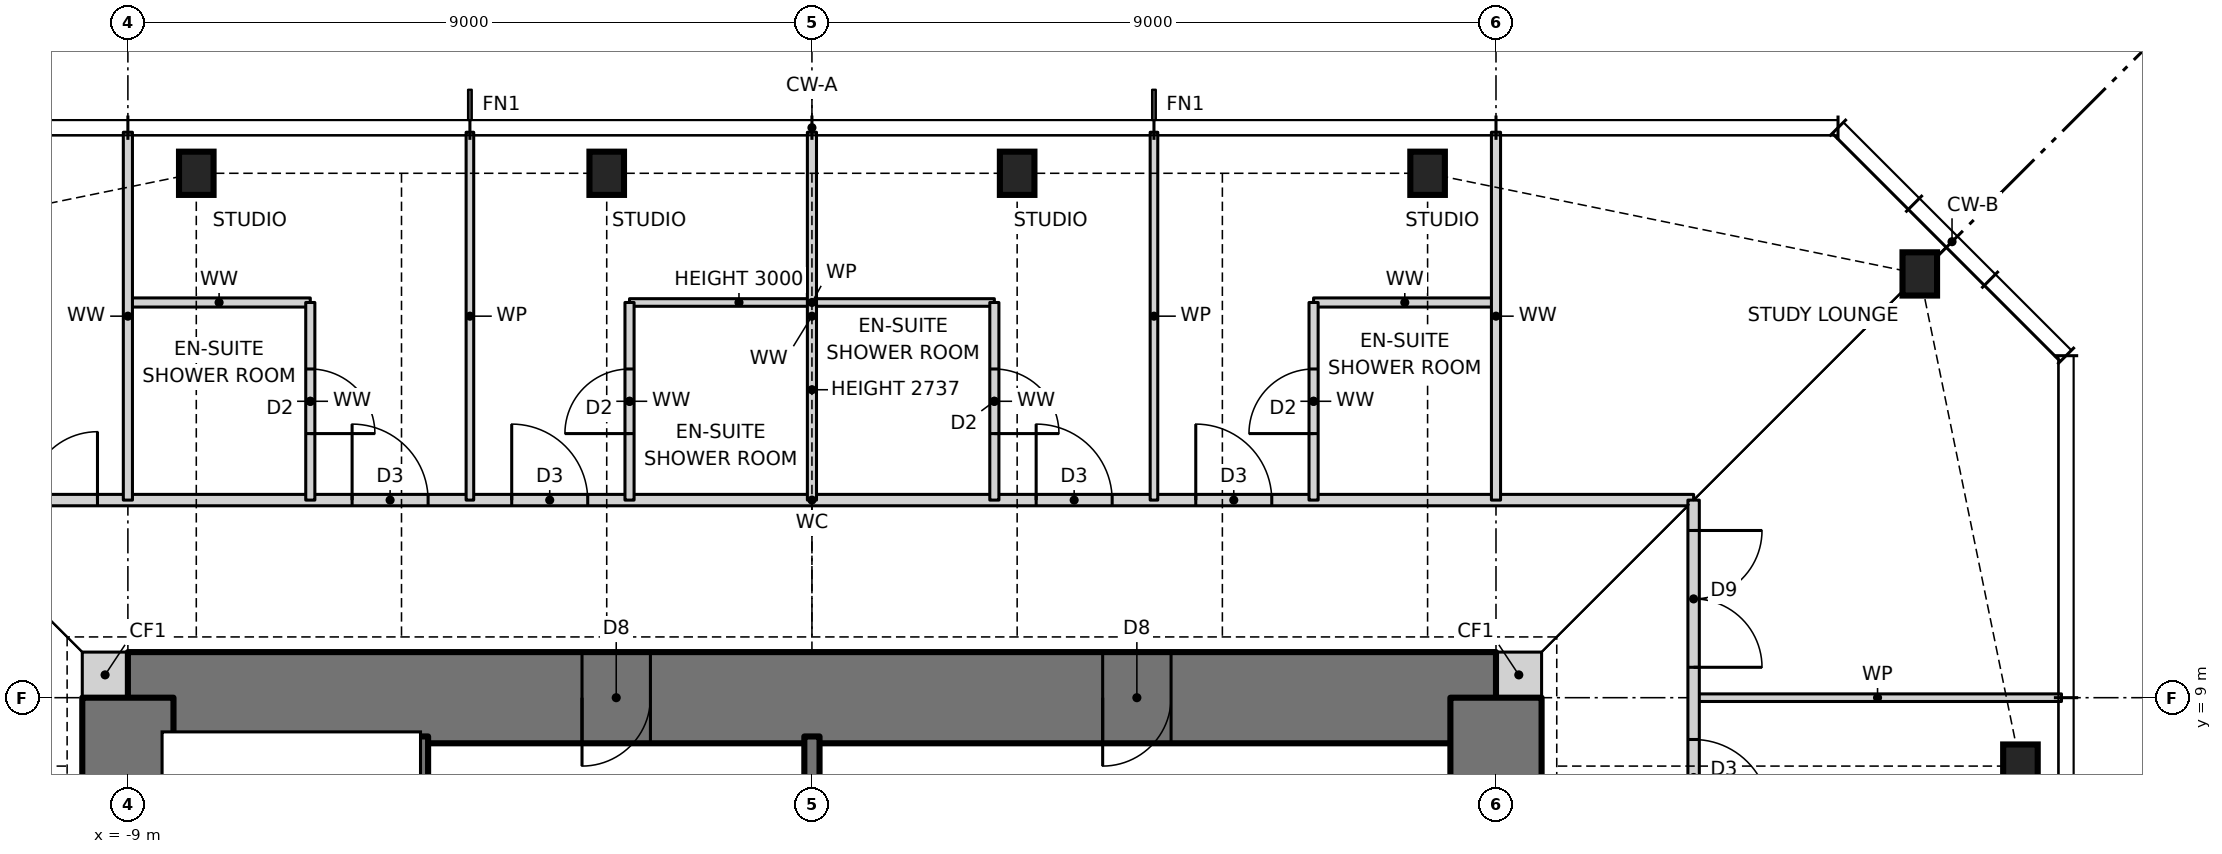
"""IFC4 building model, lengths in metres.
Left out: names, types, materials, properties, quantities, classifications, styles, units other than length and angle.
Written with IfcOpenShell. Run it as: python <this file> out.ifc"""

import sys

from ifc_helpers import new_model, si_unit, direction, frame, frame_2d, origin, origin_2d, place, context, subcontext, project, spatial, rectangle, i_section, extrude, element, fill, save


model = new_model("IFC4")
c1 = context("Model", 3, precision=1e-05, world=origin(), true_north=direction((0.0, 1.0)))
c2 = subcontext(c1, "Body", "Model", "MODEL_VIEW")
j1 = project(units=[si_unit("LENGTHUNIT", "METRE"), si_unit("PLANEANGLEUNIT", "RADIAN")], contexts=[c1])
p1 = place(None, origin())
s1 = spatial("IfcSite", under=j1, at=p1, CompositionType="ELEMENT")
p2 = place(p1, origin())
s2 = spatial("IfcBuilding", under=s1, at=p2, CompositionType="ELEMENT")
p3 = place(p2, frame((0.0, 0.0, 218.5)))
s3 = spatial("IfcBuildingStorey", under=s2, at=p3, CompositionType="ELEMENT", Elevation=218.5)
for number, where, z_axis, x_axis in (
    (1, (15.9, 8.1, 0.0), (0.0, 0.0, 1.0), (1.0, 0.0, 0.0)),
    (2, (14.576, 14.576, 0.0), (0.0, 0.0, 1.0), (1.0, 0.0, 0.0)),
    (3, (8.1, 15.9, 0.0), (0.0, 0.0, 1.0), (1.0, 0.0, 0.0)),
    (4, (2.7, 15.9, 0.0), (0.0, 0.0, 1.0), (1.0, 0.0, 0.0)),
    (5, (-2.7, 15.9, 0.0), (0.0, 0.0, 1.0), (1.0, 0.0, 0.0)),
    (6, (-8.1, 15.9, 0.0), (0.0, 0.0, 1.0), (1.0, 0.0, 0.0)),
):
    element("IfcColumn", number, at=place(p3, frame(where, z_axis=z_axis, x_axis=x_axis)), inside=s3, PredefinedType="COLUMN", context=c2, shape_type="SweptSolid", body=[
        extrude(i_section(OverallWidth=0.455, OverallDepth=0.569, WebThickness=0.078, FlangeThickness=0.125, at=origin_2d()), origin(), (0.0, 0.0, 1.0), 3.5),
    ])
for number, where, z_axis, x_axis in (
    (7, (9.0, 9.3, 0.0), (0.0, 0.0, 1.0), (1.0, 0.0, 0.0)),
    (8, (-9.6, 9.3, 0.0), (0.0, 0.0, 1.0), (1.0, 0.0, 0.0)),
):
    element("IfcWall", number, at=place(p3, frame(where, z_axis=z_axis, x_axis=x_axis)), inside=s3, PredefinedType="SOLIDWALL", context=c2, shape_type="SweptSolid", body=[
        extrude(rectangle(XDim=0.6, YDim=0.6, at=frame_2d((0.3, 0.0))), origin(), (0.0, 0.0, 1.0), 3.5),
    ])
p4 = place(p3, frame((9.0, 9.0, 0.0), z_axis=(0.0, 0.0, 1.0), x_axis=(-1.0, 0.0, 0.0)))
e9 = element("IfcWall", 9, at=p4, inside=s3, PredefinedType="SHEAR", context=c2, shape_type="SweptSolid", body=[
    extrude(rectangle(XDim=18.0, YDim=1.2, at=frame_2d((9.0, 0.0))), origin(), (0.0, 0.0, 1.0), 3.5),
])
p5 = place(p4, frame((11.125, 0.0, 0.0)))
e10 = element("IfcOpeningElement", 10, at=p5, cuts=e9, PredefinedType="OPENING", context=c2, shape_type="SweptSolid", body=[
    extrude(rectangle(XDim=0.9, YDim=2.1, at=frame_2d((0.45, 1.05))), frame((0.0, 0.61, 0.0), z_axis=(0.0, -1.0, 0.0), x_axis=(1.0, 0.0, 0.0)), (0.0, 0.0, 1.0), 1.22),
])
p6 = place(p4, frame((4.275, 0.0, 0.0)))
e11 = element("IfcOpeningElement", 11, at=p6, cuts=e9, PredefinedType="OPENING", context=c2, shape_type="SweptSolid", body=[
    extrude(rectangle(XDim=0.9, YDim=2.1, at=frame_2d((0.45, 1.05))), frame((0.0, 0.61, 0.0), z_axis=(0.0, -1.0, 0.0), x_axis=(1.0, 0.0, 0.0)), (0.0, 0.0, 1.0), 1.22),
])
p7 = place(p3, frame((9.0, -9.0, 0.0), z_axis=(0.0, 0.0, 1.0), x_axis=(0.0, 1.0, 0.0)))
e12 = element("IfcWall", 12, at=p7, inside=s3, PredefinedType="SHEAR", context=c2, shape_type="SweptSolid", body=[
    extrude(rectangle(XDim=18.0, YDim=1.2, at=frame_2d((9.0, 0.0))), origin(), (0.0, 0.0, 1.0), 3.5),
])
p8 = place(p7, frame((8.5, 0.0, 0.0)))
e13 = element("IfcOpeningElement", 13, at=p8, cuts=e12, PredefinedType="OPENING", context=c2, shape_type="SweptSolid", body=[
    extrude(rectangle(XDim=1.0, YDim=2.1, at=frame_2d((0.5, 1.05))), frame((0.0, 0.61, 0.0), z_axis=(0.0, -1.0, 0.0), x_axis=(1.0, 0.0, 0.0)), (0.0, 0.0, 1.0), 1.22),
])
p9 = place(p3, frame((-9.0, 9.0, 0.0), z_axis=(0.0, 0.0, 1.0), x_axis=(0.0, -1.0, 0.0)))
e14 = element("IfcWall", 14, at=p9, inside=s3, PredefinedType="SHEAR", context=c2, shape_type="SweptSolid", body=[
    extrude(rectangle(XDim=18.0, YDim=1.2, at=frame_2d((9.0, 0.0))), origin(), (0.0, 0.0, 1.0), 3.5),
])
p10 = place(p9, frame((8.5, 0.0, 0.0)))
e15 = element("IfcOpeningElement", 15, at=p10, cuts=e14, PredefinedType="OPENING", context=c2, shape_type="SweptSolid", body=[
    extrude(rectangle(XDim=1.0, YDim=2.1, at=frame_2d((0.5, 1.05))), frame((0.0, 0.61, 0.0), z_axis=(0.0, -1.0, 0.0), x_axis=(1.0, 0.0, 0.0)), (0.0, 0.0, 1.0), 1.22),
])
p11 = place(p3, frame((11.6, 9.0, 0.0), z_axis=(0.0, 0.0, 1.0), x_axis=(1.0, 0.0, 0.0)))
e16 = element("IfcWall", 16, at=p11, inside=s3, PredefinedType="PARTITIONING", context=c2, shape_type="SweptSolid", body=[
    extrude(rectangle(XDim=4.84, YDim=0.1, at=frame_2d((2.42, 0.0))), origin(), (0.0, 0.0, 1.0), 3.27),
])
p12 = place(p3, frame((-11.6, 11.6, 0.0), z_axis=(0.0, 0.0, 1.0), x_axis=(1.0, 0.0, 0.0)))
e17 = element("IfcWall", 17, at=p12, inside=s3, PredefinedType="PARTITIONING", context=c2, shape_type="SweptSolid", body=[
    extrude(rectangle(XDim=23.2, YDim=0.15, at=frame_2d((11.6, 0.0))), origin(), (0.0, 0.0, 1.0), 3.27),
])
p13 = place(p12, frame((16.65, 0.0, 0.0)))
e18 = element("IfcOpeningElement", 18, at=p13, cuts=e17, PredefinedType="OPENING", context=c2, shape_type="SweptSolid", body=[
    extrude(rectangle(XDim=1.0, YDim=2.1, at=frame_2d((0.5, 1.05))), frame((0.0, 0.085, 0.0), z_axis=(0.0, -1.0, 0.0), x_axis=(1.0, 0.0, 0.0)), (0.0, 0.0, 1.0), 0.17),
])
p14 = place(p12, frame((14.55, 0.0, 0.0)))
e19 = element("IfcOpeningElement", 19, at=p14, cuts=e17, PredefinedType="OPENING", context=c2, shape_type="SweptSolid", body=[
    extrude(rectangle(XDim=1.0, YDim=2.1, at=frame_2d((0.5, 1.05))), frame((0.0, 0.085, 0.0), z_axis=(0.0, -1.0, 0.0), x_axis=(1.0, 0.0, 0.0)), (0.0, 0.0, 1.0), 0.17),
])
p15 = place(p12, frame((7.65, 0.0, 0.0)))
e20 = element("IfcOpeningElement", 20, at=p15, cuts=e17, PredefinedType="OPENING", context=c2, shape_type="SweptSolid", body=[
    extrude(rectangle(XDim=1.0, YDim=2.1, at=frame_2d((0.5, 1.05))), frame((0.0, 0.085, 0.0), z_axis=(0.0, -1.0, 0.0), x_axis=(1.0, 0.0, 0.0)), (0.0, 0.0, 1.0), 0.17),
])
p16 = place(p12, frame((5.55, 0.0, 0.0)))
e21 = element("IfcOpeningElement", 21, at=p16, cuts=e17, PredefinedType="OPENING", context=c2, shape_type="SweptSolid", body=[
    extrude(rectangle(XDim=1.0, YDim=2.1, at=frame_2d((0.5, 1.05))), frame((0.0, 0.085, 0.0), z_axis=(0.0, -1.0, 0.0), x_axis=(1.0, 0.0, 0.0)), (0.0, 0.0, 1.0), 0.17),
])
p17 = place(p12, frame((0.4, 0.0, 0.0)))
e22 = element("IfcOpeningElement", 22, at=p17, cuts=e17, PredefinedType="OPENING", context=c2, shape_type="SweptSolid", body=[
    extrude(rectangle(XDim=1.8, YDim=2.1, at=frame_2d((0.9, 1.05))), frame((0.0, 0.085, 0.0), z_axis=(0.0, -1.0, 0.0), x_axis=(1.0, 0.0, 0.0)), (0.0, 0.0, 1.0), 0.17),
])
p18 = place(p3, frame((-9.0, 14.2, 0.0), z_axis=(0.0, 0.0, 1.0), x_axis=(1.0, 0.0, 0.0)))
e23 = element("IfcWall", 23, at=p18, inside=s3, PredefinedType="PARTITIONING", context=c2, shape_type="SweptSolid", body=[
    extrude(rectangle(XDim=2.4, YDim=0.12, at=frame_2d((1.2, 0.0))), origin(), (0.0, 0.0, 1.0), 3.27),
])
p19 = place(p3, frame((-2.4, 14.2, 0.0), z_axis=(0.0, 0.0, 1.0), x_axis=(1.0, 0.0, 0.0)))
e24 = element("IfcWall", 24, at=p19, inside=s3, PredefinedType="PARTITIONING", context=c2, shape_type="SweptSolid", body=[
    extrude(rectangle(XDim=4.8, YDim=0.1, at=frame_2d((2.4, 0.0))), origin(), (0.0, 0.0, 1.0), 3.0),
])
p20 = place(p3, frame((6.6, 14.2, 0.0), z_axis=(0.0, 0.0, 1.0), x_axis=(1.0, 0.0, 0.0)))
e25 = element("IfcWall", 25, at=p20, inside=s3, PredefinedType="PARTITIONING", context=c2, shape_type="SweptSolid", body=[
    extrude(rectangle(XDim=2.4, YDim=0.12, at=frame_2d((1.2, 0.0))), origin(), (0.0, 0.0, 1.0), 3.27),
])
p21 = place(p3, frame((11.6, -11.6, 0.0), z_axis=(0.0, 0.0, 1.0), x_axis=(0.0, 1.0, 0.0)))
e26 = element("IfcWall", 26, at=p21, inside=s3, PredefinedType="PARTITIONING", context=c2, shape_type="SweptSolid", body=[
    extrude(rectangle(XDim=23.2, YDim=0.15, at=frame_2d((11.6, 0.0))), origin(), (0.0, 0.0, 1.0), 3.27),
])
p22 = place(p21, frame((5.7, 0.0, 0.0)))
e27 = element("IfcOpeningElement", 27, at=p22, cuts=e26, PredefinedType="OPENING", context=c2, shape_type="SweptSolid", body=[
    extrude(rectangle(XDim=1.0, YDim=2.1, at=frame_2d((0.5, 1.05))), frame((0.0, 0.085, 0.0), z_axis=(0.0, -1.0, 0.0), x_axis=(1.0, 0.0, 0.0)), (0.0, 0.0, 1.0), 0.17),
])
p23 = place(p21, frame((12.15, 0.0, 0.0)))
e28 = element("IfcOpeningElement", 28, at=p23, cuts=e26, PredefinedType="OPENING", context=c2, shape_type="SweptSolid", body=[
    extrude(rectangle(XDim=1.0, YDim=2.1, at=frame_2d((0.5, 1.05))), frame((0.0, 0.085, 0.0), z_axis=(0.0, -1.0, 0.0), x_axis=(1.0, 0.0, 0.0)), (0.0, 0.0, 1.0), 0.17),
])
p24 = place(p21, frame((19.05, 0.0, 0.0)))
e29 = element("IfcOpeningElement", 29, at=p24, cuts=e26, PredefinedType="OPENING", context=c2, shape_type="SweptSolid", body=[
    extrude(rectangle(XDim=1.0, YDim=2.1, at=frame_2d((0.5, 1.05))), frame((0.0, 0.085, 0.0), z_axis=(0.0, -1.0, 0.0), x_axis=(1.0, 0.0, 0.0)), (0.0, 0.0, 1.0), 0.17),
])
p25 = place(p21, frame((21.0, 0.0, 0.0)))
e30 = element("IfcOpeningElement", 30, at=p25, cuts=e26, PredefinedType="OPENING", context=c2, shape_type="SweptSolid", body=[
    extrude(rectangle(XDim=1.8, YDim=2.1, at=frame_2d((0.9, 1.05))), frame((0.0, 0.085, 0.0), z_axis=(0.0, -1.0, 0.0), x_axis=(1.0, 0.0, 0.0)), (0.0, 0.0, 1.0), 0.17),
])
p26 = place(p3, frame((9.0, 11.6, 0.0), z_axis=(0.0, 0.0, 1.0), x_axis=(0.0, 1.0, 0.0)))
e31 = element("IfcWall", 31, at=p26, inside=s3, PredefinedType="PARTITIONING", context=c2, shape_type="SweptSolid", body=[
    extrude(rectangle(XDim=4.84, YDim=0.12, at=frame_2d((2.42, 0.0))), origin(), (0.0, 0.0, 1.0), 3.27),
])
p27 = place(p3, frame((6.6, 11.6, 0.0), z_axis=(0.0, 0.0, 1.0), x_axis=(0.0, 1.0, 0.0)))
e32 = element("IfcWall", 32, at=p27, inside=s3, PredefinedType="PARTITIONING", context=c2, shape_type="SweptSolid", body=[
    extrude(rectangle(XDim=2.6, YDim=0.12, at=frame_2d((1.3, 0.0))), origin(), (0.0, 0.0, 1.0), 3.27),
])
p28 = place(p27, frame((0.875, 0.0, 0.0)))
e33 = element("IfcOpeningElement", 33, at=p28, cuts=e32, PredefinedType="OPENING", context=c2, shape_type="SweptSolid", body=[
    extrude(rectangle(XDim=0.85, YDim=2.1, at=frame_2d((0.425, 1.05))), frame((0.0, 0.07, 0.0), z_axis=(0.0, -1.0, 0.0), x_axis=(1.0, 0.0, 0.0)), (0.0, 0.0, 1.0), 0.14),
])
p29 = place(p3, frame((4.5, 11.6, 0.0), z_axis=(0.0, 0.0, 1.0), x_axis=(0.0, 1.0, 0.0)))
e34 = element("IfcWall", 34, at=p29, inside=s3, PredefinedType="PARTITIONING", context=c2, shape_type="SweptSolid", body=[
    extrude(rectangle(XDim=4.84, YDim=0.1, at=frame_2d((2.42, 0.0))), origin(), (0.0, 0.0, 1.0), 3.27),
])
p30 = place(p3, frame((2.4, 11.6, 0.0), z_axis=(0.0, 0.0, 1.0), x_axis=(0.0, 1.0, 0.0)))
e35 = element("IfcWall", 35, at=p30, inside=s3, PredefinedType="PARTITIONING", context=c2, shape_type="SweptSolid", body=[
    extrude(rectangle(XDim=2.6, YDim=0.12, at=frame_2d((1.3, 0.0))), origin(), (0.0, 0.0, 1.0), 3.27),
])
p31 = place(p30, frame((0.875, 0.0, 0.0)))
e36 = element("IfcOpeningElement", 36, at=p31, cuts=e35, PredefinedType="OPENING", context=c2, shape_type="SweptSolid", body=[
    extrude(rectangle(XDim=0.85, YDim=2.1, at=frame_2d((0.425, 1.05))), frame((0.0, 0.07, 0.0), z_axis=(0.0, -1.0, 0.0), x_axis=(1.0, 0.0, 0.0)), (0.0, 0.0, 1.0), 0.14),
])
p32 = place(p3, frame((0.0, 4.4, 0.0), z_axis=(0.0, 0.0, 1.0), x_axis=(0.0, 1.0, 0.0)))
e37 = element("IfcWall", 37, at=p32, inside=s3, PredefinedType="SOLIDWALL", context=c2, shape_type="SweptSolid", body=[
    extrude(rectangle(XDim=4.09, YDim=0.2, at=frame_2d((2.045, 0.0))), origin(), (0.0, 0.0, 1.0), 3.5),
])
p33 = place(p3, frame((0.0, 11.6, 0.0), z_axis=(0.0, 0.0, 1.0), x_axis=(0.0, 1.0, 0.0)))
e38 = element("IfcWall", 38, at=p33, inside=s3, PredefinedType="PARTITIONING", context=c2, shape_type="SweptSolid", body=[
    extrude(rectangle(XDim=4.84, YDim=0.12, at=frame_2d((2.42, 0.0))), origin(), (0.0, 0.0, 1.0), 2.737),
])
p34 = place(p3, frame((-2.4, 11.6, 0.0), z_axis=(0.0, 0.0, 1.0), x_axis=(0.0, 1.0, 0.0)))
e39 = element("IfcWall", 39, at=p34, inside=s3, PredefinedType="PARTITIONING", context=c2, shape_type="SweptSolid", body=[
    extrude(rectangle(XDim=2.6, YDim=0.12, at=frame_2d((1.3, 0.0))), origin(), (0.0, 0.0, 1.0), 3.27),
])
p35 = place(p34, frame((0.875, 0.0, 0.0)))
e40 = element("IfcOpeningElement", 40, at=p35, cuts=e39, PredefinedType="OPENING", context=c2, shape_type="SweptSolid", body=[
    extrude(rectangle(XDim=0.85, YDim=2.1, at=frame_2d((0.425, 1.05))), frame((0.0, 0.07, 0.0), z_axis=(0.0, -1.0, 0.0), x_axis=(1.0, 0.0, 0.0)), (0.0, 0.0, 1.0), 0.14),
])
p36 = place(p3, frame((-4.5, 11.6, 0.0), z_axis=(0.0, 0.0, 1.0), x_axis=(0.0, 1.0, 0.0)))
e41 = element("IfcWall", 41, at=p36, inside=s3, PredefinedType="PARTITIONING", context=c2, shape_type="SweptSolid", body=[
    extrude(rectangle(XDim=4.84, YDim=0.1, at=frame_2d((2.42, 0.0))), origin(), (0.0, 0.0, 1.0), 3.27),
])
p37 = place(p3, frame((-5.15, 1.6, 0.0), z_axis=(0.0, 0.0, 1.0), x_axis=(0.0, 1.0, 0.0)))
e42 = element("IfcWall", 42, at=p37, inside=s3, PredefinedType="SOLIDWALL", context=c2, shape_type="SweptSolid", body=[
    extrude(rectangle(XDim=6.89, YDim=0.2, at=frame_2d((3.445, 0.0))), origin(), (0.0, 0.0, 1.0), 3.5),
])
p38 = place(p3, frame((-6.6, 11.6, 0.0), z_axis=(0.0, 0.0, 1.0), x_axis=(0.0, 1.0, 0.0)))
e43 = element("IfcWall", 43, at=p38, inside=s3, PredefinedType="PARTITIONING", context=c2, shape_type="SweptSolid", body=[
    extrude(rectangle(XDim=2.6, YDim=0.12, at=frame_2d((1.3, 0.0))), origin(), (0.0, 0.0, 1.0), 3.27),
])
p39 = place(p38, frame((0.875, 0.0, 0.0)))
e44 = element("IfcOpeningElement", 44, at=p39, cuts=e43, PredefinedType="OPENING", context=c2, shape_type="SweptSolid", body=[
    extrude(rectangle(XDim=0.85, YDim=2.1, at=frame_2d((0.425, 1.05))), frame((0.0, 0.07, 0.0), z_axis=(0.0, -1.0, 0.0), x_axis=(1.0, 0.0, 0.0)), (0.0, 0.0, 1.0), 0.14),
])
p40 = place(p3, frame((-9.0, 11.6, 0.0), z_axis=(0.0, 0.0, 1.0), x_axis=(0.0, 1.0, 0.0)))
e45 = element("IfcWall", 45, at=p40, inside=s3, PredefinedType="PARTITIONING", context=c2, shape_type="SweptSolid", body=[
    extrude(rectangle(XDim=4.84, YDim=0.12, at=frame_2d((2.42, 0.0))), origin(), (0.0, 0.0, 1.0), 3.27),
])
p41 = place(p24, frame((1.0, 0.0, 0.0), z_axis=(0.0, 0.0, 1.0), x_axis=(-1.0, 0.0, 0.0)))
e46 = element("IfcDoor", 46, at=p41, inside=s3, OperationType="SINGLE_SWING_RIGHT", PredefinedType="DOOR", context=c2, shape_type="SweptSolid", body=[
    extrude(rectangle(XDim=1.0, YDim=2.1, at=frame_2d((0.5, 1.05))), frame((0.0, 0.025, 0.0), z_axis=(0.0, -1.0, 0.0), x_axis=(1.0, 0.0, 0.0)), (0.0, 0.0, 1.0), 0.05),
])
fill(e29, e46)
p42 = place(p13, origin())
e47 = element("IfcDoor", 47, at=p42, inside=s3, OperationType="SINGLE_SWING_LEFT", PredefinedType="DOOR", context=c2, shape_type="SweptSolid", body=[
    extrude(rectangle(XDim=1.0, YDim=2.1, at=frame_2d((0.5, 1.05))), frame((0.0, 0.025, 0.0), z_axis=(0.0, -1.0, 0.0), x_axis=(1.0, 0.0, 0.0)), (0.0, 0.0, 1.0), 0.05),
])
fill(e18, e47)
p43 = place(p28, origin())
e48 = element("IfcDoor", 48, at=p43, inside=s3, OperationType="SINGLE_SWING_LEFT", PredefinedType="DOOR", context=c2, shape_type="SweptSolid", body=[
    extrude(rectangle(XDim=0.85, YDim=2.1, at=frame_2d((0.425, 1.05))), frame((0.0, 0.025, 0.0), z_axis=(0.0, -1.0, 0.0), x_axis=(1.0, 0.0, 0.0)), (0.0, 0.0, 1.0), 0.05),
])
fill(e33, e48)
p44 = place(p14, origin())
e49 = element("IfcDoor", 49, at=p44, inside=s3, OperationType="SINGLE_SWING_LEFT", PredefinedType="DOOR", context=c2, shape_type="SweptSolid", body=[
    extrude(rectangle(XDim=1.0, YDim=2.1, at=frame_2d((0.5, 1.05))), frame((0.0, 0.025, 0.0), z_axis=(0.0, -1.0, 0.0), x_axis=(1.0, 0.0, 0.0)), (0.0, 0.0, 1.0), 0.05),
])
fill(e19, e49)
p45 = place(p31, frame((0.85, 0.0, 0.0), z_axis=(0.0, 0.0, 1.0), x_axis=(-1.0, 0.0, 0.0)))
e50 = element("IfcDoor", 50, at=p45, inside=s3, OperationType="SINGLE_SWING_RIGHT", PredefinedType="DOOR", context=c2, shape_type="SweptSolid", body=[
    extrude(rectangle(XDim=0.85, YDim=2.1, at=frame_2d((0.425, 1.05))), frame((0.0, 0.025, 0.0), z_axis=(0.0, -1.0, 0.0), x_axis=(1.0, 0.0, 0.0)), (0.0, 0.0, 1.0), 0.05),
])
fill(e36, e50)
p46 = place(p15, origin())
e51 = element("IfcDoor", 51, at=p46, inside=s3, OperationType="SINGLE_SWING_LEFT", PredefinedType="DOOR", context=c2, shape_type="SweptSolid", body=[
    extrude(rectangle(XDim=1.0, YDim=2.1, at=frame_2d((0.5, 1.05))), frame((0.0, 0.025, 0.0), z_axis=(0.0, -1.0, 0.0), x_axis=(1.0, 0.0, 0.0)), (0.0, 0.0, 1.0), 0.05),
])
fill(e20, e51)
p47 = place(p35, origin())
e52 = element("IfcDoor", 52, at=p47, inside=s3, OperationType="SINGLE_SWING_LEFT", PredefinedType="DOOR", context=c2, shape_type="SweptSolid", body=[
    extrude(rectangle(XDim=0.85, YDim=2.1, at=frame_2d((0.425, 1.05))), frame((0.0, 0.025, 0.0), z_axis=(0.0, -1.0, 0.0), x_axis=(1.0, 0.0, 0.0)), (0.0, 0.0, 1.0), 0.05),
])
fill(e40, e52)
p48 = place(p16, origin())
e53 = element("IfcDoor", 53, at=p48, inside=s3, OperationType="SINGLE_SWING_LEFT", PredefinedType="DOOR", context=c2, shape_type="SweptSolid", body=[
    extrude(rectangle(XDim=1.0, YDim=2.1, at=frame_2d((0.5, 1.05))), frame((0.0, 0.025, 0.0), z_axis=(0.0, -1.0, 0.0), x_axis=(1.0, 0.0, 0.0)), (0.0, 0.0, 1.0), 0.05),
])
fill(e21, e53)
p49 = place(p39, frame((0.85, 0.0, 0.0), z_axis=(0.0, 0.0, 1.0), x_axis=(-1.0, 0.0, 0.0)))
e54 = element("IfcDoor", 54, at=p49, inside=s3, OperationType="SINGLE_SWING_RIGHT", PredefinedType="DOOR", context=c2, shape_type="SweptSolid", body=[
    extrude(rectangle(XDim=0.85, YDim=2.1, at=frame_2d((0.425, 1.05))), frame((0.0, 0.025, 0.0), z_axis=(0.0, -1.0, 0.0), x_axis=(1.0, 0.0, 0.0)), (0.0, 0.0, 1.0), 0.05),
])
fill(e44, e54)
p50 = place(p25, frame((1.8, 0.0, 0.0), z_axis=(0.0, 0.0, 1.0), x_axis=(-1.0, 0.0, 0.0)))
e55 = element("IfcDoor", 55, at=p50, inside=s3, OperationType="DOUBLE_DOOR_SINGLE_SWING", PredefinedType="DOOR", context=c2, shape_type="SweptSolid", body=[
    extrude(rectangle(XDim=1.8, YDim=2.1, at=frame_2d((0.9, 1.05))), frame((0.0, 0.025, 0.0), z_axis=(0.0, -1.0, 0.0), x_axis=(1.0, 0.0, 0.0)), (0.0, 0.0, 1.0), 0.05),
])
fill(e30, e55)
p51 = place(p17, origin())
e56 = element("IfcDoor", 56, at=p51, inside=s3, OperationType="DOUBLE_DOOR_SINGLE_SWING", PredefinedType="DOOR", context=c2, shape_type="SweptSolid", body=[
    extrude(rectangle(XDim=1.8, YDim=2.1, at=frame_2d((0.9, 1.05))), frame((0.0, 0.025, 0.0), z_axis=(0.0, -1.0, 0.0), x_axis=(1.0, 0.0, 0.0)), (0.0, 0.0, 1.0), 0.05),
])
fill(e22, e56)
p52 = place(p5, origin())
e57 = element("IfcDoor", 57, at=p52, inside=s3, OperationType="SINGLE_SWING_RIGHT", PredefinedType="DOOR", context=c2, shape_type="SweptSolid", body=[
    extrude(rectangle(XDim=0.9, YDim=2.1, at=frame_2d((0.45, 1.05))), frame((0.0, 0.025, 0.0), z_axis=(0.0, -1.0, 0.0), x_axis=(1.0, 0.0, 0.0)), (0.0, 0.0, 1.0), 0.05),
])
fill(e10, e57)
p53 = place(p6, origin())
e58 = element("IfcDoor", 58, at=p53, inside=s3, OperationType="SINGLE_SWING_RIGHT", PredefinedType="DOOR", context=c2, shape_type="SweptSolid", body=[
    extrude(rectangle(XDim=0.9, YDim=2.1, at=frame_2d((0.45, 1.05))), frame((0.0, 0.025, 0.0), z_axis=(0.0, -1.0, 0.0), x_axis=(1.0, 0.0, 0.0)), (0.0, 0.0, 1.0), 0.05),
])
fill(e11, e58)
save(model, sys.argv[1])
